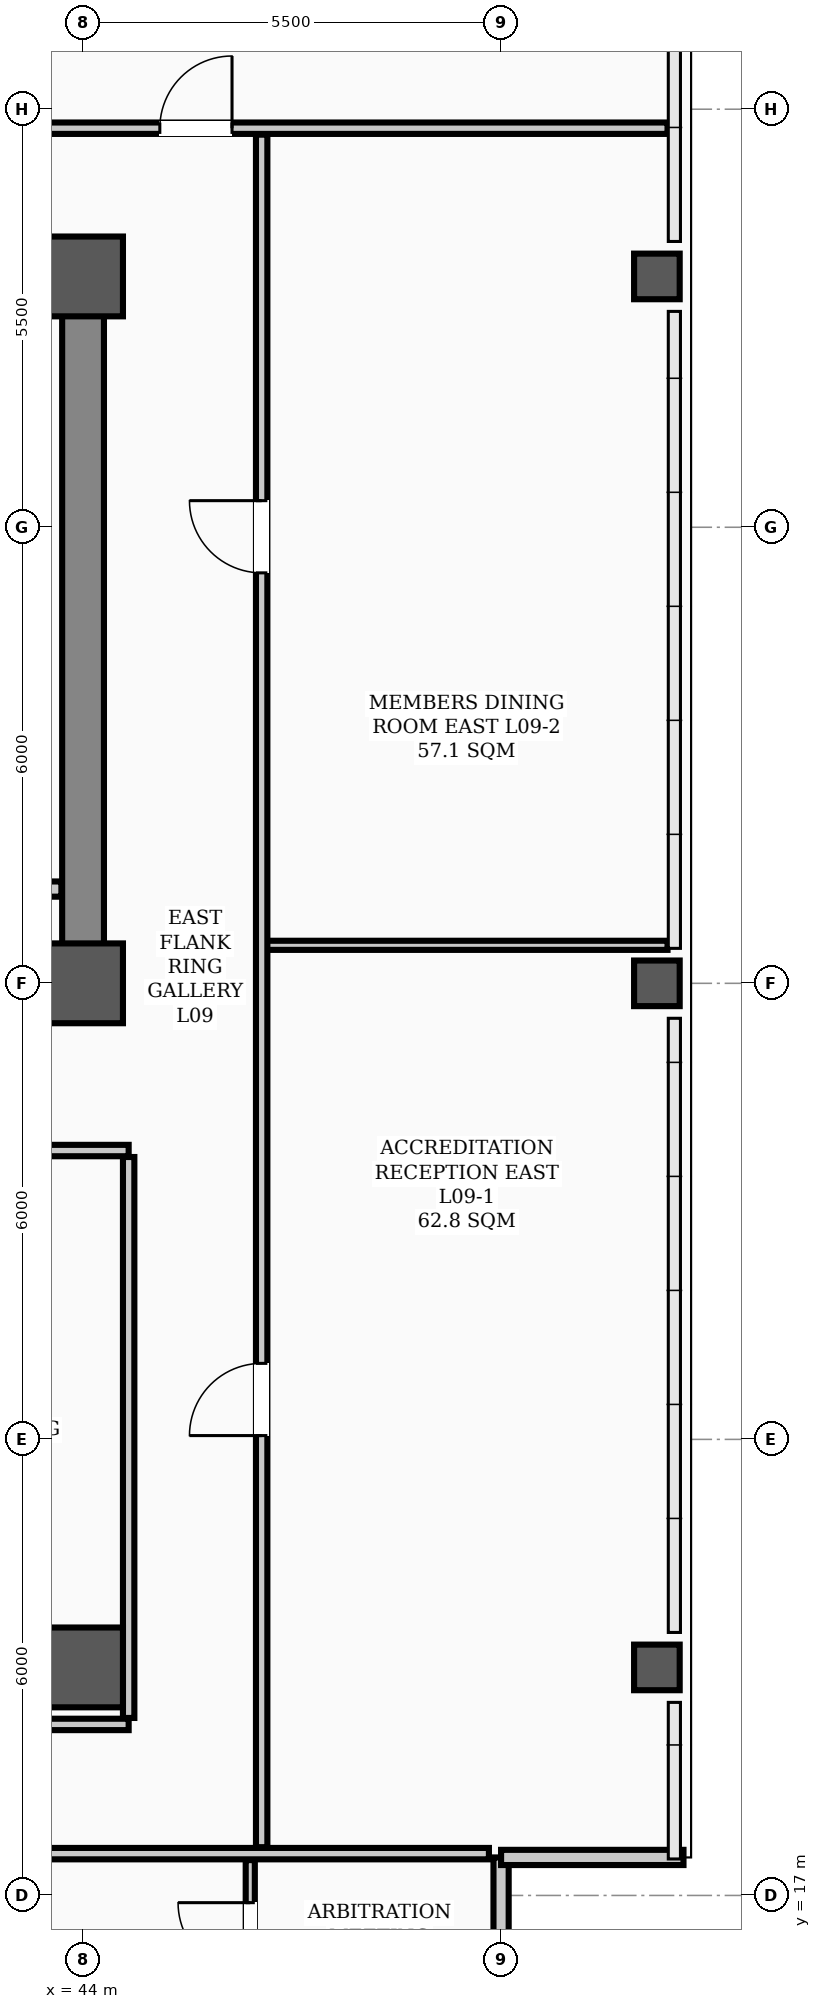
"""IFC4 building model, lengths in metres.
Left out: names, types, materials, properties, quantities, classifications, styles, units other than length and angle.
Written with IfcOpenShell. Run it as: python <this file> out.ifc"""

import sys

from ifc_helpers import new_model, si_unit, direction, frame, frame_2d, origin, origin_2d, place, context, subcontext, project, spatial, rectangle, hollow_rectangle, extrude, element, fill, save


model = new_model("IFC4")
c1 = context("Model", 3, precision=1e-05, world=origin(), true_north=direction((0.0, 1.0)))
c2 = subcontext(c1, "Body", "Model", "MODEL_VIEW")
j1 = project(units=[si_unit("LENGTHUNIT", "METRE"), si_unit("PLANEANGLEUNIT", "RADIAN")], contexts=[c1])
p1 = place(None, origin())
s1 = spatial("IfcSite", under=j1, at=p1, CompositionType="ELEMENT")
p2 = place(p1, origin())
s2 = spatial("IfcBuilding", under=s1, at=p2, CompositionType="ELEMENT")
p3 = place(p2, frame((0.0, 0.0, 38.2)))
s3 = spatial("IfcBuildingStorey", under=s2, at=p3, CompositionType="ELEMENT", Elevation=38.2)
for number, where, z_axis, x_axis in (
    (1, (44.0, 29.0, 0.0), (0.0, 0.0, 1.0), (1.0, 0.0, 0.0)),
    (2, (44.0, 38.3, 0.0), (0.0, 0.0, 1.0), (1.0, 0.0, 0.0)),
    (3, (44.0, 20.0, 0.0), (0.0, 0.0, 1.0), (1.0, 0.0, 0.0)),
):
    element("IfcColumn", number, at=place(p3, frame(where, z_axis=z_axis, x_axis=x_axis)), inside=s3, PredefinedType="COLUMN", context=c2, shape_type="SweptSolid", body=[
        extrude(hollow_rectangle(XDim=1.05, YDim=1.05, WallThickness=0.038, InnerFilletRadius=0.019, OuterFilletRadius=0.057, at=origin_2d()), origin(), (0.0, 0.0, 1.0), 3.9),
    ])
for number, where, z_axis, x_axis in (
    (4, (51.55, 20.0, 0.0), (0.0, 0.0, 1.0), (1.0, 0.0, 0.0)),
    (5, (51.55, 29.0, 0.0), (0.0, 0.0, 1.0), (1.0, 0.0, 0.0)),
    (6, (51.55, 38.3, 0.0), (0.0, 0.0, 1.0), (1.0, 0.0, 0.0)),
):
    element("IfcColumn", number, at=place(p3, frame(where, z_axis=z_axis, x_axis=x_axis)), inside=s3, PredefinedType="COLUMN", context=c2, shape_type="SweptSolid", body=[
        extrude(hollow_rectangle(XDim=0.6, YDim=0.6, WallThickness=0.026, InnerFilletRadius=0.013, OuterFilletRadius=0.039, at=origin_2d()), origin(), (0.0, 0.0, 1.0), 3.9),
    ])
for number, where, z_axis, x_axis in (
    (7, (49.5, 15.1, 0.0), (0.0, 0.0, 1.0), (0.0, 1.0, 0.0)),
    (8, (49.5, 17.5, 0.0), (0.0, 0.0, 1.0), (1.0, 0.0, 0.0)),
):
    element("IfcWall", number, at=place(p3, frame(where, z_axis=z_axis, x_axis=x_axis)), inside=s3, PredefinedType="PARAPET", context=c2, shape_type="SweptSolid", body=[
        extrude(rectangle(XDim=2.4, YDim=0.2, at=frame_2d((1.2, 0.0))), origin(), (0.0, 0.0, 1.0), 1.2),
    ])
p4 = place(p3, frame((13.5, 29.0, 0.0), z_axis=(0.0, 0.0, 1.0), x_axis=(1.0, 0.0, 0.0)))
e9 = element("IfcWall", 9, at=p4, inside=s3, PredefinedType="SHEAR", context=c2, shape_type="SweptSolid", body=[
    extrude(rectangle(XDim=30.5, YDim=0.55, at=frame_2d((15.25, 0.0))), origin(), (0.0, 0.0, 1.0), 3.72),
])
p5 = place(p4, frame((1.75, 0.0, 0.0)))
e10 = element("IfcOpeningElement", 10, at=p5, cuts=e9, PredefinedType="OPENING", context=c2, shape_type="SweptSolid", body=[
    extrude(rectangle(XDim=1.1, YDim=2.08, at=frame_2d((0.55, 1.04))), frame((0.0, 0.285, 0.0), z_axis=(0.0, -1.0, 0.0), x_axis=(1.0, 0.0, 0.0)), (0.0, 0.0, 1.0), 0.57),
])
p6 = place(p4, frame((26.7, 0.0, 0.0)))
e11 = element("IfcOpeningElement", 11, at=p6, cuts=e9, PredefinedType="OPENING", context=c2, shape_type="SweptSolid", body=[
    extrude(rectangle(XDim=1.1, YDim=2.08, at=frame_2d((0.55, 1.04))), frame((0.0, 0.285, 0.0), z_axis=(0.0, -1.0, 0.0), x_axis=(1.0, 0.0, 0.0)), (0.0, 0.0, 1.0), 0.57),
])
p7 = place(p4, frame((6.8, 0.0, 0.0)))
e12 = element("IfcOpeningElement", 12, at=p7, cuts=e9, PredefinedType="OPENING", context=c2, shape_type="SweptSolid", body=[
    extrude(rectangle(XDim=1.1, YDim=2.08, at=frame_2d((0.55, 1.04))), frame((0.0, 0.285, 0.0), z_axis=(0.0, -1.0, 0.0), x_axis=(1.0, 0.0, 0.0)), (0.0, 0.0, 1.0), 0.57),
])
p8 = place(p4, frame((13.2, 0.0, 0.0)))
e13 = element("IfcOpeningElement", 13, at=p8, cuts=e9, PredefinedType="OPENING", context=c2, shape_type="SweptSolid", body=[
    extrude(rectangle(XDim=1.6, YDim=2.08, at=frame_2d((0.8, 1.04))), frame((0.0, 0.285, 0.0), z_axis=(0.0, -1.0, 0.0), x_axis=(1.0, 0.0, 0.0)), (0.0, 0.0, 1.0), 0.57),
])
p9 = place(p4, frame((19.5, 0.0, 0.0)))
e14 = element("IfcOpeningElement", 14, at=p9, cuts=e9, PredefinedType="OPENING", context=c2, shape_type="SweptSolid", body=[
    extrude(rectangle(XDim=0.9, YDim=2.08, at=frame_2d((0.45, 1.04))), frame((0.0, 0.285, 0.0), z_axis=(0.0, -1.0, 0.0), x_axis=(1.0, 0.0, 0.0)), (0.0, 0.0, 1.0), 0.57),
])
p10 = place(p4, frame((21.55, 0.0, 0.0)))
e15 = element("IfcOpeningElement", 15, at=p10, cuts=e9, PredefinedType="OPENING", context=c2, shape_type="SweptSolid", body=[
    extrude(rectangle(XDim=0.9, YDim=2.08, at=frame_2d((0.45, 1.04))), frame((0.0, 0.285, 0.0), z_axis=(0.0, -1.0, 0.0), x_axis=(1.0, 0.0, 0.0)), (0.0, 0.0, 1.0), 0.57),
])
p11 = place(p3, frame((13.5, 38.3, 0.0), z_axis=(0.0, 0.0, 1.0), x_axis=(1.0, 0.0, 0.0)))
e16 = element("IfcWall", 16, at=p11, inside=s3, PredefinedType="SHEAR", context=c2, shape_type="SweptSolid", body=[
    extrude(rectangle(XDim=30.5, YDim=0.55, at=frame_2d((15.25, 0.0))), origin(), (0.0, 0.0, 1.0), 3.72),
])
p12 = place(p3, frame((44.0, 29.35, 0.0), z_axis=(0.0, 0.0, 1.0), x_axis=(0.0, 1.0, 0.0)))
e17 = element("IfcWall", 17, at=p12, inside=s3, PredefinedType="SHEAR", context=c2, shape_type="SweptSolid", body=[
    extrude(rectangle(XDim=8.6, YDim=0.55, at=frame_2d((4.3, 0.0))), origin(), (0.0, 0.0, 1.0), 3.72),
])
p13 = place(p3, frame((42.4, 30.24, 0.0), z_axis=(0.0, 0.0, 1.0), x_axis=(1.0, 0.0, 0.0)))
e18 = element("IfcWall", 18, at=p13, inside=s3, PredefinedType="STANDARD", context=c2, shape_type="SweptSolid", body=[
    extrude(rectangle(XDim=1.315, YDim=0.2, at=frame_2d((0.658, 0.0))), origin(), (0.0, 0.0, 1.0), 3.1),
])
p14 = place(p3, frame((12.9, 26.8, 0.0), z_axis=(0.0, 0.0, 1.0), x_axis=(1.0, 0.0, 0.0)))
e19 = element("IfcWall", 19, at=p14, inside=s3, PredefinedType="PARTITIONING", context=c2, shape_type="SweptSolid", body=[
    extrude(rectangle(XDim=31.7, YDim=0.15, at=frame_2d((15.85, 0.0))), origin(), (0.0, 0.0, 1.0), 3.1),
])
p15 = place(p14, frame((13.6, 0.0, 0.0)))
e20 = element("IfcOpeningElement", 20, at=p15, cuts=e19, PredefinedType="OPENING", context=c2, shape_type="SweptSolid", body=[
    extrude(rectangle(XDim=1.6, YDim=2.08, at=frame_2d((0.8, 1.04))), frame((0.0, 0.085, 0.0), z_axis=(0.0, -1.0, 0.0), x_axis=(1.0, 0.0, 0.0)), (0.0, 0.0, 1.0), 0.17),
])
p16 = place(p14, frame((2.875, 0.0, 0.0)))
e21 = element("IfcOpeningElement", 21, at=p16, cuts=e19, PredefinedType="OPENING", context=c2, shape_type="SweptSolid", body=[
    extrude(rectangle(XDim=0.95, YDim=2.08, at=frame_2d((0.475, 1.04))), frame((0.0, 0.085, 0.0), z_axis=(0.0, -1.0, 0.0), x_axis=(1.0, 0.0, 0.0)), (0.0, 0.0, 1.0), 0.17),
])
p17 = place(p14, frame((8.625, 0.0, 0.0)))
e22 = element("IfcOpeningElement", 22, at=p17, cuts=e19, PredefinedType="OPENING", context=c2, shape_type="SweptSolid", body=[
    extrude(rectangle(XDim=0.95, YDim=2.08, at=frame_2d((0.475, 1.04))), frame((0.0, 0.085, 0.0), z_axis=(0.0, -1.0, 0.0), x_axis=(1.0, 0.0, 0.0)), (0.0, 0.0, 1.0), 0.17),
])
p18 = place(p14, frame((16.075, 0.0, 0.0)))
e23 = element("IfcOpeningElement", 23, at=p18, cuts=e19, PredefinedType="OPENING", context=c2, shape_type="SweptSolid", body=[
    extrude(rectangle(XDim=0.95, YDim=2.08, at=frame_2d((0.475, 1.04))), frame((0.0, 0.085, 0.0), z_axis=(0.0, -1.0, 0.0), x_axis=(1.0, 0.0, 0.0)), (0.0, 0.0, 1.0), 0.17),
])
p19 = place(p14, frame((21.875, 0.0, 0.0)))
e24 = element("IfcOpeningElement", 24, at=p19, cuts=e19, PredefinedType="OPENING", context=c2, shape_type="SweptSolid", body=[
    extrude(rectangle(XDim=0.95, YDim=2.08, at=frame_2d((0.475, 1.04))), frame((0.0, 0.085, 0.0), z_axis=(0.0, -1.0, 0.0), x_axis=(1.0, 0.0, 0.0)), (0.0, 0.0, 1.0), 0.17),
])
p20 = place(p14, frame((29.025, 0.0, 0.0)))
e25 = element("IfcOpeningElement", 25, at=p20, cuts=e19, PredefinedType="OPENING", context=c2, shape_type="SweptSolid", body=[
    extrude(rectangle(XDim=0.95, YDim=2.08, at=frame_2d((0.475, 1.04))), frame((0.0, 0.085, 0.0), z_axis=(0.0, -1.0, 0.0), x_axis=(1.0, 0.0, 0.0)), (0.0, 0.0, 1.0), 0.17),
])
p21 = place(p3, frame((4.66, 17.55, 0.0), z_axis=(0.0, 0.0, 1.0), x_axis=(1.0, 0.0, 0.0)))
e26 = element("IfcWall", 26, at=p21, inside=s3, PredefinedType="PARTITIONING", context=c2, shape_type="SweptSolid", body=[
    extrude(rectangle(XDim=44.68, YDim=0.15, at=frame_2d((22.34, 0.0))), origin(), (0.0, 0.0, 1.0), 3.1),
])
p22 = place(p21, frame((7.34, 0.0, 0.0)))
e27 = element("IfcOpeningElement", 27, at=p22, cuts=e26, PredefinedType="OPENING", context=c2, shape_type="SweptSolid", body=[
    extrude(rectangle(XDim=0.95, YDim=2.08, at=frame_2d((0.475, 1.04))), frame((0.0, 0.085, 0.0), z_axis=(0.0, -1.0, 0.0), x_axis=(1.0, 0.0, 0.0)), (0.0, 0.0, 1.0), 0.17),
])
p23 = place(p21, frame((12.465, 0.0, 0.0)))
e28 = element("IfcOpeningElement", 28, at=p23, cuts=e26, PredefinedType="OPENING", context=c2, shape_type="SweptSolid", body=[
    extrude(rectangle(XDim=0.95, YDim=2.08, at=frame_2d((0.475, 1.04))), frame((0.0, 0.085, 0.0), z_axis=(0.0, -1.0, 0.0), x_axis=(1.0, 0.0, 0.0)), (0.0, 0.0, 1.0), 0.17),
])
p24 = place(p21, frame((29.265, 0.0, 0.0)))
e29 = element("IfcOpeningElement", 29, at=p24, cuts=e26, PredefinedType="OPENING", context=c2, shape_type="SweptSolid", body=[
    extrude(rectangle(XDim=0.95, YDim=2.08, at=frame_2d((0.475, 1.04))), frame((0.0, 0.085, 0.0), z_axis=(0.0, -1.0, 0.0), x_axis=(1.0, 0.0, 0.0)), (0.0, 0.0, 1.0), 0.17),
])
p25 = place(p21, frame((37.265, 0.0, 0.0)))
e30 = element("IfcOpeningElement", 30, at=p25, cuts=e26, PredefinedType="OPENING", context=c2, shape_type="SweptSolid", body=[
    extrude(rectangle(XDim=0.95, YDim=2.08, at=frame_2d((0.475, 1.04))), frame((0.0, 0.085, 0.0), z_axis=(0.0, -1.0, 0.0), x_axis=(1.0, 0.0, 0.0)), (0.0, 0.0, 1.0), 0.17),
])
p26 = place(p3, frame((28.4, 19.25, 0.0), z_axis=(0.0, 0.0, 1.0), x_axis=(1.0, 0.0, 0.0)))
e31 = element("IfcWall", 31, at=p26, inside=s3, PredefinedType="PARTITIONING", context=c2, shape_type="SweptSolid", body=[
    extrude(rectangle(XDim=16.2, YDim=0.15, at=frame_2d((8.1, 0.0))), origin(), (0.0, 0.0, 1.0), 3.1),
])
p27 = place(p3, frame((46.35, 29.5, 0.0), z_axis=(0.0, 0.0, 1.0), x_axis=(1.0, 0.0, 0.0)))
e32 = element("IfcWall", 32, at=p27, inside=s3, PredefinedType="PARTITIONING", context=c2, shape_type="SweptSolid", body=[
    extrude(rectangle(XDim=5.34, YDim=0.12, at=frame_2d((2.67, 0.0))), origin(), (0.0, 0.0, 1.0), 3.0),
])
p28 = place(p3, frame((2.31, 40.25, 0.0), z_axis=(0.0, 0.0, 1.0), x_axis=(1.0, 0.0, 0.0)))
e33 = element("IfcWall", 33, at=p28, inside=s3, PredefinedType="PARTITIONING", context=c2, shape_type="SweptSolid", body=[
    extrude(rectangle(XDim=49.38, YDim=0.15, at=frame_2d((24.69, 0.0))), origin(), (0.0, 0.0, 1.0), 3.1),
])
p29 = place(p28, frame((9.23, 0.0, 0.0)))
e34 = element("IfcOpeningElement", 34, at=p29, cuts=e33, PredefinedType="OPENING", context=c2, shape_type="SweptSolid", body=[
    extrude(rectangle(XDim=0.95, YDim=2.08, at=frame_2d((0.475, 1.04))), frame((0.0, 0.085, 0.0), z_axis=(0.0, -1.0, 0.0), x_axis=(1.0, 0.0, 0.0)), (0.0, 0.0, 1.0), 0.17),
])
p30 = place(p28, frame((23.115, 0.0, 0.0)))
e35 = element("IfcOpeningElement", 35, at=p30, cuts=e33, PredefinedType="OPENING", context=c2, shape_type="SweptSolid", body=[
    extrude(rectangle(XDim=0.95, YDim=2.08, at=frame_2d((0.475, 1.04))), frame((0.0, 0.085, 0.0), z_axis=(0.0, -1.0, 0.0), x_axis=(1.0, 0.0, 0.0)), (0.0, 0.0, 1.0), 0.17),
])
p31 = place(p28, frame((31.515, 0.0, 0.0)))
e36 = element("IfcOpeningElement", 36, at=p31, cuts=e33, PredefinedType="OPENING", context=c2, shape_type="SweptSolid", body=[
    extrude(rectangle(XDim=0.95, YDim=2.08, at=frame_2d((0.475, 1.04))), frame((0.0, 0.085, 0.0), z_axis=(0.0, -1.0, 0.0), x_axis=(1.0, 0.0, 0.0)), (0.0, 0.0, 1.0), 0.17),
])
p32 = place(p28, frame((42.7, 0.0, 0.0)))
e37 = element("IfcOpeningElement", 37, at=p32, cuts=e33, PredefinedType="OPENING", context=c2, shape_type="SweptSolid", body=[
    extrude(rectangle(XDim=0.95, YDim=2.08, at=frame_2d((0.475, 1.04))), frame((0.0, 0.085, 0.0), z_axis=(0.0, -1.0, 0.0), x_axis=(1.0, 0.0, 0.0)), (0.0, 0.0, 1.0), 0.17),
])
p33 = place(p3, frame((46.35, 17.635, 0.0), z_axis=(0.0, 0.0, 1.0), x_axis=(0.0, 1.0, 0.0)))
e38 = element("IfcWall", 38, at=p33, inside=s3, PredefinedType="PARTITIONING", context=c2, shape_type="SweptSolid", body=[
    extrude(rectangle(XDim=22.53, YDim=0.15, at=frame_2d((11.265, 0.0))), origin(), (0.0, 0.0, 1.0), 3.0),
])
p34 = place(p33, frame((5.415, 0.0, 0.0)))
e39 = element("IfcOpeningElement", 39, at=p34, cuts=e38, PredefinedType="OPENING", context=c2, shape_type="SweptSolid", body=[
    extrude(rectangle(XDim=0.95, YDim=2.08, at=frame_2d((0.475, 1.04))), frame((0.0, 0.085, 0.0), z_axis=(0.0, -1.0, 0.0), x_axis=(1.0, 0.0, 0.0)), (0.0, 0.0, 1.0), 0.17),
])
p35 = place(p33, frame((16.765, 0.0, 0.0)))
e40 = element("IfcOpeningElement", 40, at=p35, cuts=e38, PredefinedType="OPENING", context=c2, shape_type="SweptSolid", body=[
    extrude(rectangle(XDim=0.95, YDim=2.08, at=frame_2d((0.475, 1.04))), frame((0.0, 0.085, 0.0), z_axis=(0.0, -1.0, 0.0), x_axis=(1.0, 0.0, 0.0)), (0.0, 0.0, 1.0), 0.17),
])
p36 = place(p3, frame((44.6, 19.335, 0.0), z_axis=(0.0, 0.0, 1.0), x_axis=(0.0, 1.0, 0.0)))
e41 = element("IfcWall", 41, at=p36, inside=s3, PredefinedType="PARTITIONING", context=c2, shape_type="SweptSolid", body=[
    extrude(rectangle(XDim=7.38, YDim=0.15, at=frame_2d((3.69, 0.0))), origin(), (0.0, 0.0, 1.0), 3.0),
])
p37 = place(p3, frame((46.2, 15.31, 0.0), z_axis=(0.0, 0.0, 1.0), x_axis=(0.0, 1.0, 0.0)))
e42 = element("IfcWall", 42, at=p37, inside=s3, PredefinedType="PARTITIONING", context=c2, shape_type="SweptSolid", body=[
    extrude(rectangle(XDim=2.155, YDim=0.12, at=frame_2d((1.078, 0.0))), origin(), (0.0, 0.0, 1.0), 3.72),
])
p38 = place(p37, frame((0.645, 0.0, 0.0)))
e43 = element("IfcOpeningElement", 43, at=p38, cuts=e42, PredefinedType="OPENING", context=c2, shape_type="SweptSolid", body=[
    extrude(rectangle(XDim=0.95, YDim=2.08, at=frame_2d((0.475, 1.04))), frame((0.0, 0.07, 0.0), z_axis=(0.0, -1.0, 0.0), x_axis=(1.0, 0.0, 0.0)), (0.0, 0.0, 1.0), 0.14),
])
p39 = place(p38, origin())
e44 = element("IfcDoor", 44, at=p39, inside=s3, OperationType="SINGLE_SWING_RIGHT", PredefinedType="DOOR", context=c2, shape_type="SweptSolid", body=[
    extrude(rectangle(XDim=0.95, YDim=2.08, at=frame_2d((0.475, 1.04))), frame((0.0, 0.025, 0.0), z_axis=(0.0, -1.0, 0.0), x_axis=(1.0, 0.0, 0.0)), (0.0, 0.0, 1.0), 0.05),
])
fill(e43, e44)
p40 = place(p34, origin())
e45 = element("IfcDoor", 45, at=p40, inside=s3, OperationType="SINGLE_SWING_LEFT", PredefinedType="DOOR", context=c2, shape_type="SweptSolid", body=[
    extrude(rectangle(XDim=0.95, YDim=2.08, at=frame_2d((0.475, 1.04))), frame((0.0, 0.025, 0.0), z_axis=(0.0, -1.0, 0.0), x_axis=(1.0, 0.0, 0.0)), (0.0, 0.0, 1.0), 0.05),
])
fill(e39, e45)
p41 = place(p35, origin())
e46 = element("IfcDoor", 46, at=p41, inside=s3, OperationType="SINGLE_SWING_RIGHT", PredefinedType="DOOR", context=c2, shape_type="SweptSolid", body=[
    extrude(rectangle(XDim=0.95, YDim=2.08, at=frame_2d((0.475, 1.04))), frame((0.0, 0.025, 0.0), z_axis=(0.0, -1.0, 0.0), x_axis=(1.0, 0.0, 0.0)), (0.0, 0.0, 1.0), 0.05),
])
fill(e40, e46)
p42 = place(p32, origin())
e47 = element("IfcDoor", 47, at=p42, inside=s3, OperationType="SINGLE_SWING_RIGHT", PredefinedType="DOOR", context=c2, shape_type="SweptSolid", body=[
    extrude(rectangle(XDim=0.95, YDim=2.08, at=frame_2d((0.475, 1.04))), frame((0.0, 0.025, 0.0), z_axis=(0.0, -1.0, 0.0), x_axis=(1.0, 0.0, 0.0)), (0.0, 0.0, 1.0), 0.05),
])
fill(e37, e47)
save(model, sys.argv[1])
